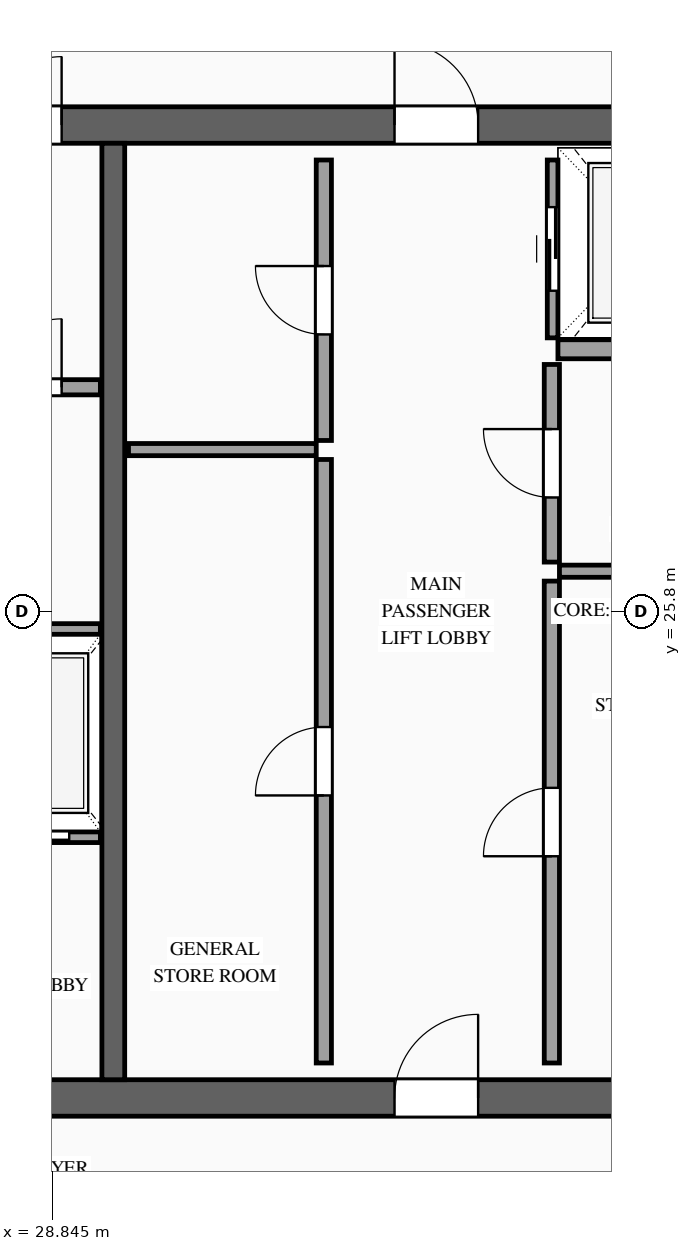
"""IFC4 building model, lengths in metres.
Left out: names, types, materials, properties, quantities, classifications, styles, units other than length and angle.
Written with IfcOpenShell. Run it as: python <this file> out.ifc"""

import sys

from ifc_helpers import new_model, si_unit, direction, frame, frame_2d, origin, place, context, subcontext, project, spatial, rectangle, extrude, source, transform, mapped, element, fill, save


model = new_model("IFC4")
c1 = context("Model", 3, precision=1e-05, world=origin(), true_north=direction((0.0, 1.0)))
c2 = subcontext(c1, "Body", "Model", "MODEL_VIEW")
j1 = project(units=[si_unit("LENGTHUNIT", "METRE"), si_unit("PLANEANGLEUNIT", "RADIAN")], contexts=[c1])
p1 = place(None, origin())
s1 = spatial("IfcSite", under=j1, at=p1, CompositionType="ELEMENT")
p2 = place(p1, origin())
s2 = spatial("IfcBuilding", under=s1, at=p2, CompositionType="ELEMENT")
p3 = place(p2, frame((0.0, 0.0, 311.2)))
s3 = spatial("IfcBuildingStorey", under=s2, at=p3, CompositionType="ELEMENT", Elevation=311.2)
p4 = place(p3, frame((23.56, 19.4, 0.0), z_axis=(0.0, 0.0, 1.0), x_axis=(1.0, 0.0, 0.0)))
e1 = element("IfcWall", 1, at=p4, inside=s3, PredefinedType="SHEAR", context=c2, shape_type="SweptSolid", body=[
    extrude(rectangle(XDim=26.88, YDim=0.48, at=frame_2d((13.44, 0.0))), origin(), (0.0, 0.0, 1.0), 3.5),
])
p5 = place(p4, frame((1.89, 0.0, 0.0)))
e2 = element("IfcOpeningElement", 2, at=p5, cuts=e1, PredefinedType="OPENING", context=c2, shape_type="SweptSolid", body=[
    extrude(rectangle(XDim=1.1, YDim=2.2, at=frame_2d((0.55, 1.1))), frame((0.0, 0.255, 0.0), z_axis=(0.0, -1.0, 0.0), x_axis=(1.0, 0.0, 0.0)), (0.0, 0.0, 1.0), 0.51),
])
p6 = place(p4, frame((9.79, 0.0, 0.0)))
e3 = element("IfcOpeningElement", 3, at=p6, cuts=e1, PredefinedType="OPENING", context=c2, shape_type="SweptSolid", body=[
    extrude(rectangle(XDim=1.1, YDim=2.2, at=frame_2d((0.55, 1.1))), frame((0.0, 0.255, 0.0), z_axis=(0.0, -1.0, 0.0), x_axis=(1.0, 0.0, 0.0)), (0.0, 0.0, 1.0), 0.51),
])
p7 = place(p4, frame((22.99, 0.0, 0.0)))
e4 = element("IfcOpeningElement", 4, at=p7, cuts=e1, PredefinedType="OPENING", context=c2, shape_type="SweptSolid", body=[
    extrude(rectangle(XDim=1.1, YDim=2.2, at=frame_2d((0.55, 1.1))), frame((0.0, 0.255, 0.0), z_axis=(0.0, -1.0, 0.0), x_axis=(1.0, 0.0, 0.0)), (0.0, 0.0, 1.0), 0.51),
])
p8 = place(p4, frame((19.61, 0.0, 0.0)))
e5 = element("IfcOpeningElement", 5, at=p8, cuts=e1, PredefinedType="OPENING", context=c2, shape_type="SweptSolid", body=[
    extrude(rectangle(XDim=0.9, YDim=2.15, at=frame_2d((0.45, 1.075))), frame((0.0, 0.255, 0.0), z_axis=(0.0, -1.0, 0.0), x_axis=(1.0, 0.0, 0.0)), (0.0, 0.0, 1.0), 0.51),
])
p9 = place(p4, frame((18.17, 0.0, 0.0)))
e6 = element("IfcOpeningElement", 6, at=p9, cuts=e1, PredefinedType="OPENING", context=c2, shape_type="SweptSolid", body=[
    extrude(rectangle(XDim=0.9, YDim=2.15, at=frame_2d((0.45, 1.075))), frame((0.0, 0.255, 0.0), z_axis=(0.0, -1.0, 0.0), x_axis=(1.0, 0.0, 0.0)), (0.0, 0.0, 1.0), 0.51),
])
p10 = place(p3, frame((23.56, 32.2, 0.0), z_axis=(0.0, 0.0, 1.0), x_axis=(1.0, 0.0, 0.0)))
e7 = element("IfcWall", 7, at=p10, inside=s3, PredefinedType="SHEAR", context=c2, shape_type="SweptSolid", body=[
    extrude(rectangle(XDim=26.88, YDim=0.48, at=frame_2d((13.44, 0.0))), origin(), (0.0, 0.0, 1.0), 3.5),
])
p11 = place(p10, frame((4.51, 0.0, 0.0)))
e8 = element("IfcOpeningElement", 8, at=p11, cuts=e7, PredefinedType="OPENING", context=c2, shape_type="SweptSolid", body=[
    extrude(rectangle(XDim=0.9, YDim=2.15, at=frame_2d((0.45, 1.075))), frame((0.0, 0.255, 0.0), z_axis=(0.0, -1.0, 0.0), x_axis=(1.0, 0.0, 0.0)), (0.0, 0.0, 1.0), 0.51),
])
p12 = place(p10, frame((9.79, 0.0, 0.0)))
e9 = element("IfcOpeningElement", 9, at=p12, cuts=e7, PredefinedType="OPENING", context=c2, shape_type="SweptSolid", body=[
    extrude(rectangle(XDim=1.1, YDim=2.2, at=frame_2d((0.55, 1.1))), frame((0.0, 0.255, 0.0), z_axis=(0.0, -1.0, 0.0), x_axis=(1.0, 0.0, 0.0)), (0.0, 0.0, 1.0), 0.51),
])
p13 = place(p10, frame((15.64, 0.0, 0.0)))
e10 = element("IfcOpeningElement", 10, at=p13, cuts=e7, PredefinedType="OPENING", context=c2, shape_type="SweptSolid", body=[
    extrude(rectangle(XDim=1.1, YDim=2.2, at=frame_2d((0.55, 1.1))), frame((0.0, 0.255, 0.0), z_axis=(0.0, -1.0, 0.0), x_axis=(1.0, 0.0, 0.0)), (0.0, 0.0, 1.0), 0.51),
])
p14 = place(p10, frame((18.74, 0.0, 0.0)))
e11 = element("IfcOpeningElement", 11, at=p14, cuts=e7, PredefinedType="OPENING", context=c2, shape_type="SweptSolid", body=[
    extrude(rectangle(XDim=1.1, YDim=2.2, at=frame_2d((0.55, 1.1))), frame((0.0, 0.255, 0.0), z_axis=(0.0, -1.0, 0.0), x_axis=(1.0, 0.0, 0.0)), (0.0, 0.0, 1.0), 0.51),
])
m1 = source(origin(), c2, "Body", "SweptSolid", [
    extrude(rectangle(XDim=12.32, YDim=0.3, at=frame_2d((6.16, 0.0))), origin(), (0.0, 0.0, 1.0), 3.5),
])
p15 = place(p3, frame((29.65, 19.64, 0.0), z_axis=(0.0, 0.0, 1.0), x_axis=(0.0, 1.0, 0.0)))
e12 = element("IfcWall", 12, at=p15, inside=s3, PredefinedType="SOLIDWALL", context=c2, shape_type="MappedRepresentation", body=[
    mapped(m1, transform((0.0, 0.0, 0.0), scale=1.0)),
])
p16 = place(p3, frame((27.56, 22.83, 0.0), z_axis=(0.0, 0.0, 1.0), x_axis=(1.0, 0.0, 0.0)))
e13 = element("IfcWall", 13, at=p16, inside=s3, PredefinedType="SOLIDWALL", context=c2, shape_type="SweptSolid", body=[
    extrude(rectangle(XDim=1.92, YDim=0.14, at=frame_2d((0.96, 0.0))), origin(), (0.0, 0.0, 1.0), 3.28),
])
p17 = place(p16, frame((0.41, 0.0, 0.0)))
e14 = element("IfcOpeningElement", 14, at=p17, cuts=e13, PredefinedType="OPENING", context=c2, shape_type="SweptSolid", body=[
    extrude(rectangle(XDim=1.1, YDim=2.2, at=frame_2d((0.55, 1.1))), frame((0.0, 0.085, 0.0), z_axis=(0.0, -1.0, 0.0), x_axis=(1.0, 0.0, 0.0)), (0.0, 0.0, 1.0), 0.17),
])
m2 = source(origin(), c2, "Body", "SweptSolid", [
    extrude(rectangle(XDim=1.92, YDim=0.14, at=frame_2d((0.96, 0.0))), origin(), (0.0, 0.0, 1.0), 3.28),
])
p18 = place(p3, frame((27.56, 25.57, 0.0), z_axis=(0.0, 0.0, 1.0), x_axis=(1.0, 0.0, 0.0)))
e15 = element("IfcWall", 15, at=p18, inside=s3, PredefinedType="SOLIDWALL", context=c2, shape_type="MappedRepresentation", body=[
    mapped(m2, transform((0.0, 0.0, 0.0), scale=1.0)),
])
p19 = place(p3, frame((35.43, 29.4, 0.0), z_axis=(0.0, 0.0, 1.0), x_axis=(0.0, 1.0, 0.0)))
e16 = element("IfcWall", 16, at=p19, inside=s3, PredefinedType="SOLIDWALL", context=c2, shape_type="SweptSolid", body=[
    extrude(rectangle(XDim=2.34, YDim=0.14, at=frame_2d((1.17, 0.0))), origin(), (0.0, 0.0, 1.0), 3.28),
])
p20 = place(p19, frame((0.62, 0.0, 0.0)))
e17 = element("IfcOpeningElement", 17, at=p20, cuts=e16, PredefinedType="OPENING", context=c2, shape_type="SweptSolid", body=[
    extrude(rectangle(XDim=1.1, YDim=2.2, at=frame_2d((0.55, 1.1))), frame((0.0, 0.085, 0.0), z_axis=(0.0, -1.0, 0.0), x_axis=(1.0, 0.0, 0.0)), (0.0, 0.0, 1.0), 0.17),
])
m3 = source(origin(), c2, "Body", "SweptSolid", [
    extrude(rectangle(XDim=2.4, YDim=0.25, at=frame_2d((1.2, 0.0))), origin(), (0.0, 0.0, 1.0), 3.28),
])
p21 = place(p3, frame((35.5, 29.25, 0.0), z_axis=(0.0, 0.0, 1.0), x_axis=(1.0, 0.0, 0.0)))
e18 = element("IfcWall", 18, at=p21, inside=s3, PredefinedType="SOLIDWALL", context=c2, shape_type="MappedRepresentation", body=[
    mapped(m3, transform((0.0, 0.0, 0.0), scale=1.0)),
])
p22 = place(p3, frame((27.56, 28.75, 0.0), z_axis=(0.0, 0.0, 1.0), x_axis=(1.0, 0.0, 0.0)))
e19 = element("IfcWall", 19, at=p22, inside=s3, PredefinedType="PARTITIONING", context=c2, shape_type="SweptSolid", body=[
    extrude(rectangle(XDim=1.92, YDim=0.2, at=frame_2d((0.96, 0.0))), origin(), (0.0, 0.0, 1.0), 3.28),
])
p23 = place(p22, frame((0.51, 0.0, 0.0)))
e20 = element("IfcOpeningElement", 20, at=p23, cuts=e19, PredefinedType="OPENING", context=c2, shape_type="SweptSolid", body=[
    extrude(rectangle(XDim=0.9, YDim=2.15, at=frame_2d((0.45, 1.075))), frame((0.0, 0.115, 0.0), z_axis=(0.0, -1.0, 0.0), x_axis=(1.0, 0.0, 0.0)), (0.0, 0.0, 1.0), 0.23),
])
p24 = place(p3, frame((32.42, 19.86, 0.0), z_axis=(0.0, 0.0, 1.0), x_axis=(0.0, 1.0, 0.0)))
e21 = element("IfcWall", 21, at=p24, inside=s3, PredefinedType="PARTITIONING", context=c2, shape_type="SweptSolid", body=[
    extrude(rectangle(XDim=7.94, YDim=0.2, at=frame_2d((3.97, 0.0))), origin(), (0.0, 0.0, 1.0), 3.28),
])
p25 = place(p24, frame((3.52, 0.0, 0.0)))
e22 = element("IfcOpeningElement", 22, at=p25, cuts=e21, PredefinedType="OPENING", context=c2, shape_type="SweptSolid", body=[
    extrude(rectangle(XDim=0.9, YDim=2.15, at=frame_2d((0.45, 1.075))), frame((0.0, 0.115, 0.0), z_axis=(0.0, -1.0, 0.0), x_axis=(1.0, 0.0, 0.0)), (0.0, 0.0, 1.0), 0.23),
])
p26 = place(p3, frame((32.42, 28.05, 0.0), z_axis=(0.0, 0.0, 1.0), x_axis=(0.0, 1.0, 0.0)))
e23 = element("IfcWall", 23, at=p26, inside=s3, PredefinedType="PARTITIONING", context=c2, shape_type="SweptSolid", body=[
    extrude(rectangle(XDim=3.69, YDim=0.2, at=frame_2d((1.845, 0.0))), origin(), (0.0, 0.0, 1.0), 3.28),
])
p27 = place(p26, frame((1.395, 0.0, 0.0)))
e24 = element("IfcOpeningElement", 24, at=p27, cuts=e23, PredefinedType="OPENING", context=c2, shape_type="SweptSolid", body=[
    extrude(rectangle(XDim=0.9, YDim=2.15, at=frame_2d((0.45, 1.075))), frame((0.0, 0.115, 0.0), z_axis=(0.0, -1.0, 0.0), x_axis=(1.0, 0.0, 0.0)), (0.0, 0.0, 1.0), 0.23),
])
m4 = source(origin(), c2, "Body", "SweptSolid", [
    extrude(rectangle(XDim=2.47, YDim=0.16, at=frame_2d((1.235, 0.0))), origin(), (0.0, 0.0, 1.0), 3.28),
])
p28 = place(p3, frame((29.85, 27.93, 0.0), z_axis=(0.0, 0.0, 1.0), x_axis=(1.0, 0.0, 0.0)))
e25 = element("IfcWall", 25, at=p28, inside=s3, PredefinedType="PARTITIONING", context=c2, shape_type="MappedRepresentation", body=[
    mapped(m4, transform((0.0, 0.0, 0.0), scale=1.0)),
])
p29 = place(p3, frame((35.42, 19.86, 0.0), z_axis=(0.0, 0.0, 1.0), x_axis=(0.0, 1.0, 0.0)))
e26 = element("IfcWall", 26, at=p29, inside=s3, PredefinedType="PARTITIONING", context=c2, shape_type="SweptSolid", body=[
    extrude(rectangle(XDim=6.34, YDim=0.2, at=frame_2d((3.17, 0.0))), origin(), (0.0, 0.0, 1.0), 3.28),
])
p30 = place(p29, frame((2.72, 0.0, 0.0)))
e27 = element("IfcOpeningElement", 27, at=p30, cuts=e26, PredefinedType="OPENING", context=c2, shape_type="SweptSolid", body=[
    extrude(rectangle(XDim=0.9, YDim=2.15, at=frame_2d((0.45, 1.075))), frame((0.0, 0.115, 0.0), z_axis=(0.0, -1.0, 0.0), x_axis=(1.0, 0.0, 0.0)), (0.0, 0.0, 1.0), 0.23),
])
p31 = place(p3, frame((35.42, 26.45, 0.0), z_axis=(0.0, 0.0, 1.0), x_axis=(0.0, 1.0, 0.0)))
e28 = element("IfcWall", 28, at=p31, inside=s3, PredefinedType="PARTITIONING", context=c2, shape_type="SweptSolid", body=[
    extrude(rectangle(XDim=2.6, YDim=0.2, at=frame_2d((1.3, 0.0))), origin(), (0.0, 0.0, 1.0), 3.28),
])
p32 = place(p31, frame((0.85, 0.0, 0.0)))
e29 = element("IfcOpeningElement", 29, at=p32, cuts=e28, PredefinedType="OPENING", context=c2, shape_type="SweptSolid", body=[
    extrude(rectangle(XDim=0.9, YDim=2.15, at=frame_2d((0.45, 1.075))), frame((0.0, 0.115, 0.0), z_axis=(0.0, -1.0, 0.0), x_axis=(1.0, 0.0, 0.0)), (0.0, 0.0, 1.0), 0.23),
])
m5 = source(origin(), c2, "Body", "SweptSolid", [
    extrude(rectangle(XDim=2.36, YDim=0.16, at=frame_2d((1.18, 0.0))), origin(), (0.0, 0.0, 1.0), 3.28),
])
p33 = place(p3, frame((35.52, 26.33, 0.0), z_axis=(0.0, 0.0, 1.0), x_axis=(1.0, 0.0, 0.0)))
e30 = element("IfcWall", 30, at=p33, inside=s3, PredefinedType="PARTITIONING", context=c2, shape_type="MappedRepresentation", body=[
    mapped(m5, transform((0.0, 0.0, 0.0), scale=1.0)),
])
m6 = source(origin(), c2, "Body", "SweptSolid", [
    extrude(rectangle(XDim=1.1, YDim=2.2, at=frame_2d((0.55, 1.1))), frame((0.0, 0.025, 0.0), z_axis=(0.0, -1.0, 0.0), x_axis=(1.0, 0.0, 0.0)), (0.0, 0.0, 1.0), 0.05),
])
p34 = place(p17, origin())
e31 = element("IfcDoor", 31, at=p34, inside=s3, OperationType="SLIDING_TO_LEFT", PredefinedType="DOOR", context=c2, shape_type="MappedRepresentation", body=[
    mapped(m6, transform((0.0, 0.0, 0.0), scale=1.0)),
])
fill(e14, e31)
p35 = place(p20, origin())
e32 = element("IfcDoor", 32, at=p35, inside=s3, OperationType="SLIDING_TO_RIGHT", PredefinedType="DOOR", context=c2, shape_type="MappedRepresentation", body=[
    mapped(m6, transform((0.0, 0.0, 0.0), scale=1.0)),
])
fill(e17, e32)
m7 = source(origin(), c2, "Body", "SweptSolid", [
    extrude(rectangle(XDim=1.1, YDim=2.2, at=frame_2d((0.55, 1.1))), frame((0.0, 0.025, 0.0), z_axis=(0.0, -1.0, 0.0), x_axis=(1.0, 0.0, 0.0)), (0.0, 0.0, 1.0), 0.05),
])
p36 = place(p6, origin())
e33 = element("IfcDoor", 33, at=p36, inside=s3, OperationType="SINGLE_SWING_RIGHT", PredefinedType="DOOR", context=c2, shape_type="MappedRepresentation", body=[
    mapped(m7, transform((0.0, 0.0, 0.0), scale=1.0)),
])
fill(e3, e33)
m8 = source(origin(), c2, "Body", "SweptSolid", [
    extrude(rectangle(XDim=0.9, YDim=2.15, at=frame_2d((0.45, 1.075))), frame((0.0, 0.025, 0.0), z_axis=(0.0, -1.0, 0.0), x_axis=(1.0, 0.0, 0.0)), (0.0, 0.0, 1.0), 0.05),
])
p37 = place(p11, origin())
e34 = element("IfcDoor", 34, at=p37, inside=s3, OperationType="SINGLE_SWING_RIGHT", PredefinedType="DOOR", context=c2, shape_type="MappedRepresentation", body=[
    mapped(m8, transform((0.0, 0.0, 0.0), scale=1.0)),
])
fill(e8, e34)
p38 = place(p12, origin())
e35 = element("IfcDoor", 35, at=p38, inside=s3, OperationType="SINGLE_SWING_LEFT", PredefinedType="DOOR", context=c2, shape_type="MappedRepresentation", body=[
    mapped(m7, transform((0.0, 0.0, 0.0), scale=1.0)),
])
fill(e9, e35)
p39 = place(p23, origin())
e36 = element("IfcDoor", 36, at=p39, inside=s3, OperationType="SINGLE_SWING_RIGHT", PredefinedType="DOOR", context=c2, shape_type="MappedRepresentation", body=[
    mapped(m8, transform((0.0, 0.0, 0.0), scale=1.0)),
])
fill(e20, e36)
p40 = place(p25, origin())
e37 = element("IfcDoor", 37, at=p40, inside=s3, OperationType="SINGLE_SWING_LEFT", PredefinedType="DOOR", context=c2, shape_type="MappedRepresentation", body=[
    mapped(m8, transform((0.0, 0.0, 0.0), scale=1.0)),
])
fill(e22, e37)
p41 = place(p27, origin())
e38 = element("IfcDoor", 38, at=p41, inside=s3, OperationType="SINGLE_SWING_RIGHT", PredefinedType="DOOR", context=c2, shape_type="MappedRepresentation", body=[
    mapped(m8, transform((0.0, 0.0, 0.0), scale=1.0)),
])
fill(e24, e38)
p42 = place(p30, origin())
e39 = element("IfcDoor", 39, at=p42, inside=s3, OperationType="SINGLE_SWING_LEFT", PredefinedType="DOOR", context=c2, shape_type="MappedRepresentation", body=[
    mapped(m8, transform((0.0, 0.0, 0.0), scale=1.0)),
])
fill(e27, e39)
p43 = place(p32, origin())
e40 = element("IfcDoor", 40, at=p43, inside=s3, OperationType="SINGLE_SWING_RIGHT", PredefinedType="DOOR", context=c2, shape_type="MappedRepresentation", body=[
    mapped(m8, transform((0.0, 0.0, 0.0), scale=1.0)),
])
fill(e29, e40)
save(model, sys.argv[1])
